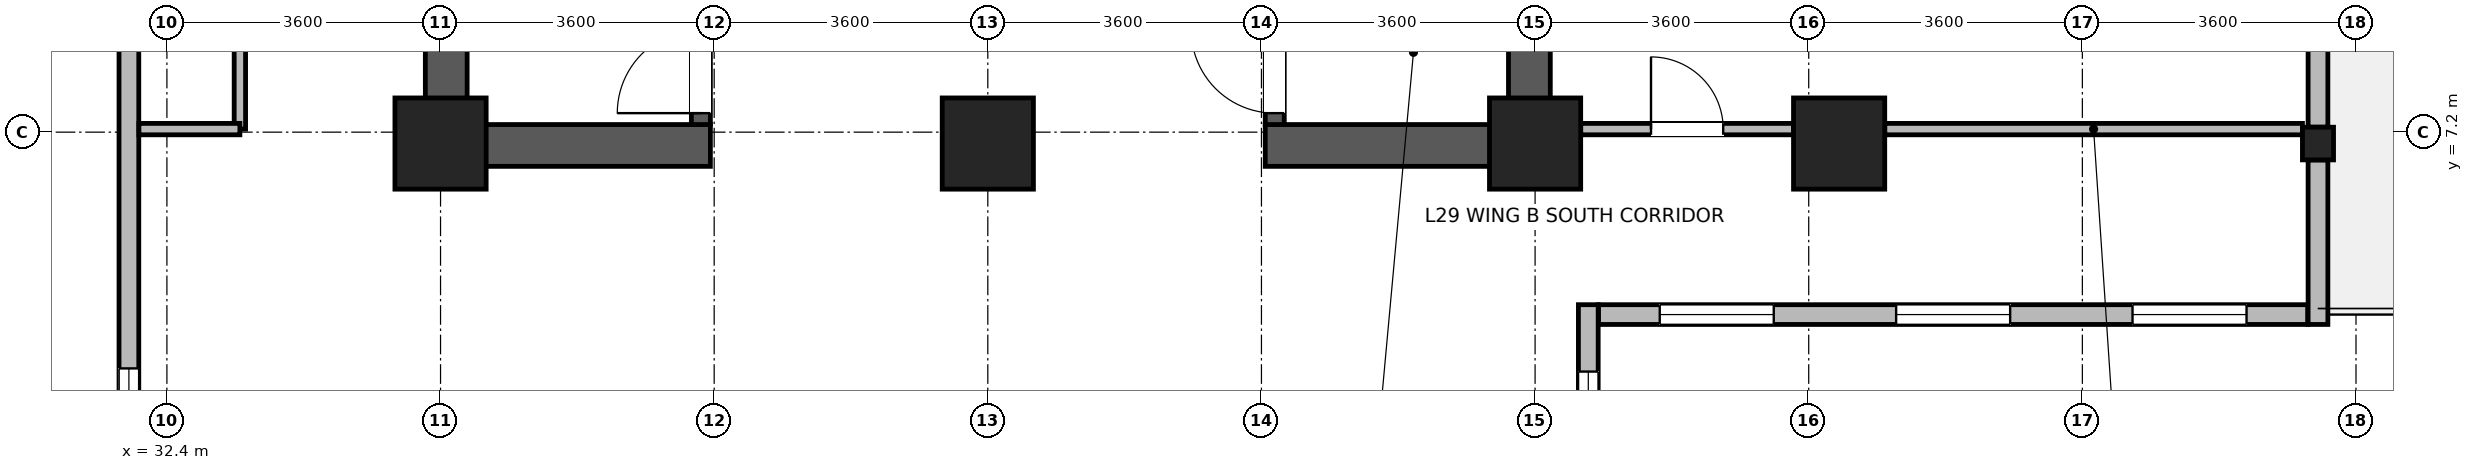
"""IFC4 building model, lengths in metres.
Left out: names, types, materials, properties, quantities, classifications, styles, units other than length and angle.
Written with IfcOpenShell. Run it as: python <this file> out.ifc"""

import sys

from ifc_helpers import new_model, si_unit, direction, frame, frame_2d, origin, origin_2d, place, context, subcontext, project, spatial, rectangle, i_section, extrude, source, transform, mapped, element, fill, save


model = new_model("IFC4")
c1 = context("Model", 3, precision=1e-05, world=origin(), true_north=direction((0.0, 1.0)))
c2 = subcontext(c1, "Body", "Model", "MODEL_VIEW")
j1 = project(units=[si_unit("LENGTHUNIT", "METRE"), si_unit("PLANEANGLEUNIT", "RADIAN")], contexts=[c1])
p1 = place(None, origin())
s1 = spatial("IfcSite", under=j1, at=p1, CompositionType="ELEMENT")
p2 = place(p1, origin())
s2 = spatial("IfcBuilding", under=s1, at=p2, CompositionType="ELEMENT")
p3 = place(p2, frame((0.0, 0.0, 115.6)))
s3 = spatial("IfcBuildingStorey", under=s2, at=p3, CompositionType="ELEMENT", Elevation=115.6)
for number, where, z_axis, x_axis in (
    (1, (36.075, 6.75, 0.0), (0.0, 0.0, 1.0), (0.0, 1.0, 0.0)),
    (2, (50.325, 6.75, 0.0), (0.0, 0.0, 1.0), (0.0, 1.0, 0.0)),
):
    element("IfcWall", number, at=place(p3, frame(where, z_axis=z_axis, x_axis=x_axis)), inside=s3, PredefinedType="SHEAR", context=c2, shape_type="SweptSolid", body=[
        extrude(rectangle(XDim=8.1, YDim=0.55, at=frame_2d((4.05, 0.0))), origin(), (0.0, 0.0, 1.0), 3.45),
    ])
for number, where, z_axis, x_axis in (
    (3, (36.35, 7.025, 0.0), (0.0, 0.0, 1.0), (1.0, 0.0, 0.0)),
    (4, (46.85, 7.025, 0.0), (0.0, 0.0, 1.0), (1.0, 0.0, 0.0)),
):
    element("IfcWall", number, at=place(p3, frame(where, z_axis=z_axis, x_axis=x_axis)), inside=s3, PredefinedType="SHEAR", context=c2, shape_type="SweptSolid", body=[
        extrude(rectangle(XDim=3.2, YDim=0.55, at=frame_2d((1.6, 0.0))), origin(), (0.0, 0.0, 1.0), 3.45),
    ])
p4 = place(p3, frame((39.425, 7.3, 0.0), z_axis=(0.0, 0.0, 1.0), x_axis=(0.0, 1.0, 0.0)))
e5 = element("IfcWall", 5, at=p4, inside=s3, PredefinedType="SHEAR", context=c2, shape_type="SweptSolid", body=[
    extrude(rectangle(XDim=7.0, YDim=0.25, at=frame_2d((3.5, 0.0))), origin(), (0.0, 0.0, 1.0), 3.45),
])
p5 = place(p4, frame((0.15, 0.0, 0.0)))
e6 = element("IfcOpeningElement", 6, at=p5, cuts=e5, PredefinedType="OPENING", context=c2, shape_type="SweptSolid", body=[
    extrude(rectangle(XDim=1.1, YDim=2.08, at=frame_2d((0.55, 1.04))), frame((0.0, 0.135, 0.0), z_axis=(0.0, -1.0, 0.0), x_axis=(1.0, 0.0, 0.0)), (0.0, 0.0, 1.0), 0.27),
])
p6 = place(p3, frame((46.975, 7.3, 0.0), z_axis=(0.0, 0.0, 1.0), x_axis=(0.0, 1.0, 0.0)))
e7 = element("IfcWall", 7, at=p6, inside=s3, PredefinedType="SHEAR", context=c2, shape_type="SweptSolid", body=[
    extrude(rectangle(XDim=7.0, YDim=0.25, at=frame_2d((3.5, 0.0))), origin(), (0.0, 0.0, 1.0), 3.45),
])
p7 = place(p6, frame((0.15, 0.0, 0.0)))
e8 = element("IfcOpeningElement", 8, at=p7, cuts=e7, PredefinedType="OPENING", context=c2, shape_type="SweptSolid", body=[
    extrude(rectangle(XDim=1.1, YDim=2.08, at=frame_2d((0.55, 1.04))), frame((0.0, 0.135, 0.0), z_axis=(0.0, -1.0, 0.0), x_axis=(1.0, 0.0, 0.0)), (0.0, 0.0, 1.0), 0.27),
])
m1 = source(origin(), c2, "Body", "SweptSolid", [
    extrude(rectangle(XDim=1.2, YDim=1.2, at=origin_2d()), origin(), (0.0, 0.0, 1.0), 3.7),
])
for number, where, z_axis, x_axis in (
    (9, (36.0, 7.05, 0.0), (0.0, 0.0, 1.0), (1.0, 0.0, 0.0)),
    (10, (43.2, 7.05, 0.0), (0.0, 0.0, 1.0), (1.0, 0.0, 0.0)),
    (11, (50.4, 7.05, 0.0), (0.0, 0.0, 1.0), (1.0, 0.0, 0.0)),
    (12, (54.4, 7.05, 0.0), (0.0, 0.0, 1.0), (1.0, 0.0, 0.0)),
):
    element("IfcColumn", number, at=place(p3, frame(where, z_axis=z_axis, x_axis=x_axis)), inside=s3, PredefinedType="COLUMN", context=c2, shape_type="MappedRepresentation", body=[
        mapped(m1, transform((0.0, 0.0, 0.0), x_axis=(1.0, 0.0, 0.0), y_axis=(0.0, 1.0, 0.0), z_axis=(0.0, 0.0, 1.0), scale=1.0)),
    ])
m2 = source(origin(), c2, "Body", "SweptSolid", [
    extrude(i_section(OverallWidth=0.409, OverallDepth=0.43, WebThickness=0.024, FlangeThickness=0.033, FilletRadius=0.015, at=origin_2d()), origin(), (0.0, 0.0, 1.0), 3.7),
])
p8 = place(p3, frame((60.7, 7.05, 0.0), z_axis=(0.0, 0.0, 1.0), x_axis=(1.0, 0.0, 0.0)))
e13 = element("IfcColumn", 13, at=p8, inside=s3, PredefinedType="COLUMN", context=c2, shape_type="MappedRepresentation", body=[
    mapped(m2, transform((0.0, 0.0, 0.0), x_axis=(1.0, 0.0, 0.0), y_axis=(0.0, 1.0, 0.0), z_axis=(0.0, 0.0, 1.0), scale=1.0)),
])
p9 = place(p3, frame((51.1, 4.93, 0.0), z_axis=(0.0, 0.0, 1.0), x_axis=(0.0, -1.0, 0.0)))
e14 = element("IfcWall", 14, at=p9, inside=s3, PredefinedType="STANDARD", context=c2, shape_type="SweptSolid", body=[
    extrude(rectangle(XDim=3.26, YDim=0.26, at=frame_2d((1.63, 0.0))), origin(), (0.0, 0.0, 1.0), 3.43),
])
p10 = place(p9, frame((0.88, 0.0, 0.85)))
e15 = element("IfcOpeningElement", 15, at=p10, cuts=e14, PredefinedType="OPENING", context=c2, shape_type="SweptSolid", body=[
    extrude(rectangle(XDim=1.5, YDim=1.85, at=frame_2d((0.75, 0.925))), frame((0.0, 0.14, 0.0), z_axis=(0.0, -1.0, 0.0), x_axis=(1.0, 0.0, 0.0)), (0.0, 0.0, 1.0), 0.28),
])
p11 = place(p3, frame((60.565, 4.8, 0.0), z_axis=(0.0, 0.0, 1.0), x_axis=(-1.0, 0.0, 0.0)))
e16 = element("IfcWall", 16, at=p11, inside=s3, PredefinedType="STANDARD", context=c2, shape_type="SweptSolid", body=[
    extrude(rectangle(XDim=9.33, YDim=0.26, at=frame_2d((4.665, 0.0))), origin(), (0.0, 0.0, 1.0), 3.43),
])
p12 = place(p11, frame((0.805, 0.0, 0.85)))
e17 = element("IfcOpeningElement", 17, at=p12, cuts=e16, PredefinedType="OPENING", context=c2, shape_type="SweptSolid", body=[
    extrude(rectangle(XDim=1.5, YDim=1.85, at=frame_2d((0.75, 0.925))), frame((0.0, 0.14, 0.0), z_axis=(0.0, -1.0, 0.0), x_axis=(1.0, 0.0, 0.0)), (0.0, 0.0, 1.0), 0.28),
])
p13 = place(p11, frame((3.915, 0.0, 0.85)))
e18 = element("IfcOpeningElement", 18, at=p13, cuts=e16, PredefinedType="OPENING", context=c2, shape_type="SweptSolid", body=[
    extrude(rectangle(XDim=1.5, YDim=1.85, at=frame_2d((0.75, 0.925))), frame((0.0, 0.14, 0.0), z_axis=(0.0, -1.0, 0.0), x_axis=(1.0, 0.0, 0.0)), (0.0, 0.0, 1.0), 0.28),
])
p14 = place(p11, frame((7.025, 0.0, 0.85)))
e19 = element("IfcOpeningElement", 19, at=p14, cuts=e16, PredefinedType="OPENING", context=c2, shape_type="SweptSolid", body=[
    extrude(rectangle(XDim=1.5, YDim=1.85, at=frame_2d((0.75, 0.925))), frame((0.0, 0.14, 0.0), z_axis=(0.0, -1.0, 0.0), x_axis=(1.0, 0.0, 0.0)), (0.0, 0.0, 1.0), 0.28),
])
p15 = place(p3, frame((60.7, 6.834, 0.0), z_axis=(0.0, 0.0, 1.0), x_axis=(0.0, -1.0, 0.0)))
e20 = element("IfcWall", 20, at=p15, inside=s3, PredefinedType="STANDARD", context=c2, shape_type="SweptSolid", body=[
    extrude(rectangle(XDim=2.164, YDim=0.26, at=frame_2d((1.082, 0.0))), origin(), (0.0, 0.0, 1.0), 3.43),
])
p16 = place(p3, frame((60.7, 14.334, 0.0), z_axis=(0.0, 0.0, 1.0), x_axis=(0.0, -1.0, 0.0)))
e21 = element("IfcWall", 21, at=p16, inside=s3, PredefinedType="STANDARD", context=c2, shape_type="SweptSolid", body=[
    extrude(rectangle(XDim=7.068, YDim=0.26, at=frame_2d((3.534, 0.0))), origin(), (0.0, 0.0, 1.0), 2.98),
])
p17 = place(p16, frame((2.784, 0.0, 0.0)))
e22 = element("IfcOpeningElement", 22, at=p17, cuts=e21, PredefinedType="OPENING", context=c2, shape_type="SweptSolid", body=[
    extrude(rectangle(XDim=1.5, YDim=2.15, at=frame_2d((0.75, 1.075))), frame((0.0, 0.14, 0.0), z_axis=(0.0, -1.0, 0.0), x_axis=(1.0, 0.0, 0.0)), (0.0, 0.0, 1.0), 0.28),
])
p18 = place(p16, frame((1.017, 0.0, 0.85)))
e23 = element("IfcOpeningElement", 23, at=p18, cuts=e21, PredefinedType="OPENING", context=c2, shape_type="SweptSolid", body=[
    extrude(rectangle(XDim=1.5, YDim=1.85, at=frame_2d((0.75, 0.925))), frame((0.0, 0.14, 0.0), z_axis=(0.0, -1.0, 0.0), x_axis=(1.0, 0.0, 0.0)), (0.0, 0.0, 1.0), 0.28),
])
p19 = place(p16, frame((4.551, 0.0, 0.85)))
e24 = element("IfcOpeningElement", 24, at=p19, cuts=e21, PredefinedType="OPENING", context=c2, shape_type="SweptSolid", body=[
    extrude(rectangle(XDim=1.5, YDim=1.85, at=frame_2d((0.75, 0.925))), frame((0.0, 0.14, 0.0), z_axis=(0.0, -1.0, 0.0), x_axis=(1.0, 0.0, 0.0)), (0.0, 0.0, 1.0), 0.28),
])
p20 = place(p3, frame((31.9, 1.67, 0.0), z_axis=(0.0, 0.0, 1.0), x_axis=(0.0, 1.0, 0.0)))
e25 = element("IfcWall", 25, at=p20, inside=s3, PredefinedType="STANDARD", context=c2, shape_type="SweptSolid", body=[
    extrude(rectangle(XDim=20.06, YDim=0.26, at=frame_2d((10.03, 0.0))), origin(), (0.0, 0.0, 1.0), 3.43),
])
p21 = place(p20, frame((0.922, 0.0, 0.85)))
e26 = element("IfcOpeningElement", 26, at=p21, cuts=e25, PredefinedType="OPENING", context=c2, shape_type="SweptSolid", body=[
    extrude(rectangle(XDim=1.5, YDim=1.85, at=frame_2d((0.75, 0.925))), frame((0.0, 0.14, 0.0), z_axis=(0.0, -1.0, 0.0), x_axis=(1.0, 0.0, 0.0)), (0.0, 0.0, 1.0), 0.28),
])
p22 = place(p20, frame((7.608, 0.0, 0.85)))
e27 = element("IfcOpeningElement", 27, at=p22, cuts=e25, PredefinedType="OPENING", context=c2, shape_type="SweptSolid", body=[
    extrude(rectangle(XDim=1.5, YDim=1.85, at=frame_2d((0.75, 0.925))), frame((0.0, 0.14, 0.0), z_axis=(0.0, -1.0, 0.0), x_axis=(1.0, 0.0, 0.0)), (0.0, 0.0, 1.0), 0.28),
])
p23 = place(p20, frame((10.952, 0.0, 0.85)))
e28 = element("IfcOpeningElement", 28, at=p23, cuts=e25, PredefinedType="OPENING", context=c2, shape_type="SweptSolid", body=[
    extrude(rectangle(XDim=1.5, YDim=1.85, at=frame_2d((0.75, 0.925))), frame((0.0, 0.14, 0.0), z_axis=(0.0, -1.0, 0.0), x_axis=(1.0, 0.0, 0.0)), (0.0, 0.0, 1.0), 0.28),
])
p24 = place(p20, frame((14.295, 0.0, 0.85)))
e29 = element("IfcOpeningElement", 29, at=p24, cuts=e25, PredefinedType="OPENING", context=c2, shape_type="SweptSolid", body=[
    extrude(rectangle(XDim=1.5, YDim=1.85, at=frame_2d((0.75, 0.925))), frame((0.0, 0.14, 0.0), z_axis=(0.0, -1.0, 0.0), x_axis=(1.0, 0.0, 0.0)), (0.0, 0.0, 1.0), 0.28),
])
p25 = place(p20, frame((17.638, 0.0, 0.85)))
e30 = element("IfcOpeningElement", 30, at=p25, cuts=e25, PredefinedType="OPENING", context=c2, shape_type="SweptSolid", body=[
    extrude(rectangle(XDim=1.5, YDim=1.85, at=frame_2d((0.75, 0.925))), frame((0.0, 0.14, 0.0), z_axis=(0.0, -1.0, 0.0), x_axis=(1.0, 0.0, 0.0)), (0.0, 0.0, 1.0), 0.28),
])
p26 = place(p3, frame((51.0, 7.24, 0.0), z_axis=(0.0, 0.0, 1.0), x_axis=(1.0, 0.0, 0.0)))
e31 = element("IfcWall", 31, at=p26, inside=s3, PredefinedType="PARTITIONING", context=c2, shape_type="SweptSolid", body=[
    extrude(rectangle(XDim=2.8, YDim=0.15, at=frame_2d((1.4, 0.0))), origin(), (0.0, 0.0, 1.0), 2.78),
])
p27 = place(p26, frame((0.925, 0.0, 0.0)))
e32 = element("IfcOpeningElement", 32, at=p27, cuts=e31, PredefinedType="OPENING", context=c2, shape_type="SweptSolid", body=[
    extrude(rectangle(XDim=0.95, YDim=2.1, at=frame_2d((0.475, 1.05))), frame((0.0, 0.085, 0.0), z_axis=(0.0, -1.0, 0.0), x_axis=(1.0, 0.0, 0.0)), (0.0, 0.0, 1.0), 0.17),
])
p28 = place(p3, frame((55.0, 7.24, 0.0), z_axis=(0.0, 0.0, 1.0), x_axis=(1.0, 0.0, 0.0)))
e33 = element("IfcWall", 33, at=p28, inside=s3, PredefinedType="PARTITIONING", context=c2, shape_type="SweptSolid", body=[
    extrude(rectangle(XDim=5.496, YDim=0.15, at=frame_2d((2.748, 0.0))), origin(), (0.0, 0.0, 1.0), 2.78),
])
p29 = place(p3, frame((33.36, 7.24, 0.0), z_axis=(0.0, 0.0, 1.0), x_axis=(0.0, 1.0, 0.0)))
e34 = element("IfcWall", 34, at=p29, inside=s3, PredefinedType="PARTITIONING", context=c2, shape_type="SweptSolid", body=[
    extrude(rectangle(XDim=7.26, YDim=0.15, at=frame_2d((3.63, 0.0))), origin(), (0.0, 0.0, 1.0), 3.43),
])
p30 = place(p29, frame((2.98, 0.0, 0.0)))
e35 = element("IfcOpeningElement", 35, at=p30, cuts=e34, PredefinedType="OPENING", context=c2, shape_type="SweptSolid", body=[
    extrude(rectangle(XDim=1.3, YDim=2.12, at=frame_2d((0.65, 1.06))), frame((0.0, 0.085, 0.0), z_axis=(0.0, -1.0, 0.0), x_axis=(1.0, 0.0, 0.0)), (0.0, 0.0, 1.0), 0.17),
])
p31 = place(p3, frame((32.032, 7.24, 0.0), z_axis=(0.0, 0.0, 1.0), x_axis=(1.0, 0.0, 0.0)))
e36 = element("IfcWall", 36, at=p31, inside=s3, PredefinedType="PARTITIONING", context=c2, shape_type="SweptSolid", body=[
    extrude(rectangle(XDim=1.328, YDim=0.15, at=frame_2d((0.664, 0.0))), origin(), (0.0, 0.0, 1.0), 3.43),
])
p32 = place(p10, origin())
e37 = element("IfcWindow", 37, at=p32, inside=s3, PartitioningType="SINGLE_PANEL", PredefinedType="WINDOW", context=c2, shape_type="SweptSolid", body=[
    extrude(rectangle(XDim=1.5, YDim=1.85, at=frame_2d((0.75, 0.925))), frame((0.0, 0.03, 0.0), z_axis=(0.0, -1.0, 0.0), x_axis=(1.0, 0.0, 0.0)), (0.0, 0.0, 1.0), 0.06),
])
fill(e15, e37)
p33 = place(p12, origin())
e38 = element("IfcWindow", 38, at=p33, inside=s3, PartitioningType="SINGLE_PANEL", PredefinedType="WINDOW", context=c2, shape_type="SweptSolid", body=[
    extrude(rectangle(XDim=1.5, YDim=1.85, at=frame_2d((0.75, 0.925))), frame((0.0, 0.03, 0.0), z_axis=(0.0, -1.0, 0.0), x_axis=(1.0, 0.0, 0.0)), (0.0, 0.0, 1.0), 0.06),
])
fill(e17, e38)
p34 = place(p13, origin())
e39 = element("IfcWindow", 39, at=p34, inside=s3, PartitioningType="SINGLE_PANEL", PredefinedType="WINDOW", context=c2, shape_type="SweptSolid", body=[
    extrude(rectangle(XDim=1.5, YDim=1.85, at=frame_2d((0.75, 0.925))), frame((0.0, 0.03, 0.0), z_axis=(0.0, -1.0, 0.0), x_axis=(1.0, 0.0, 0.0)), (0.0, 0.0, 1.0), 0.06),
])
fill(e18, e39)
p35 = place(p14, origin())
e40 = element("IfcWindow", 40, at=p35, inside=s3, PartitioningType="SINGLE_PANEL", PredefinedType="WINDOW", context=c2, shape_type="SweptSolid", body=[
    extrude(rectangle(XDim=1.5, YDim=1.85, at=frame_2d((0.75, 0.925))), frame((0.0, 0.03, 0.0), z_axis=(0.0, -1.0, 0.0), x_axis=(1.0, 0.0, 0.0)), (0.0, 0.0, 1.0), 0.06),
])
fill(e19, e40)
p36 = place(p21, origin())
e41 = element("IfcWindow", 41, at=p36, inside=s3, PartitioningType="SINGLE_PANEL", PredefinedType="WINDOW", context=c2, shape_type="SweptSolid", body=[
    extrude(rectangle(XDim=1.5, YDim=1.85, at=frame_2d((0.75, 0.925))), frame((0.0, 0.03, 0.0), z_axis=(0.0, -1.0, 0.0), x_axis=(1.0, 0.0, 0.0)), (0.0, 0.0, 1.0), 0.06),
])
fill(e26, e41)
p37 = place(p5, origin())
e42 = element("IfcDoor", 42, at=p37, inside=s3, OperationType="SINGLE_SWING_LEFT", PredefinedType="DOOR", context=c2, shape_type="SweptSolid", body=[
    extrude(rectangle(XDim=1.1, YDim=2.08, at=frame_2d((0.55, 1.04))), frame((0.0, 0.025, 0.0), z_axis=(0.0, -1.0, 0.0), x_axis=(1.0, 0.0, 0.0)), (0.0, 0.0, 1.0), 0.05),
])
fill(e6, e42)
p38 = place(p7, origin())
e43 = element("IfcDoor", 43, at=p38, inside=s3, OperationType="SINGLE_SWING_RIGHT", PredefinedType="DOOR", context=c2, shape_type="SweptSolid", body=[
    extrude(rectangle(XDim=1.1, YDim=2.08, at=frame_2d((0.55, 1.04))), frame((0.0, 0.025, 0.0), z_axis=(0.0, -1.0, 0.0), x_axis=(1.0, 0.0, 0.0)), (0.0, 0.0, 1.0), 0.05),
])
fill(e8, e43)
p39 = place(p27, origin())
e44 = element("IfcDoor", 44, at=p39, inside=s3, OperationType="SINGLE_SWING_LEFT", PredefinedType="DOOR", context=c2, shape_type="SweptSolid", body=[
    extrude(rectangle(XDim=0.95, YDim=2.1, at=frame_2d((0.475, 1.05))), frame((0.0, 0.025, 0.0), z_axis=(0.0, -1.0, 0.0), x_axis=(1.0, 0.0, 0.0)), (0.0, 0.0, 1.0), 0.05),
])
fill(e32, e44)
save(model, sys.argv[1])
